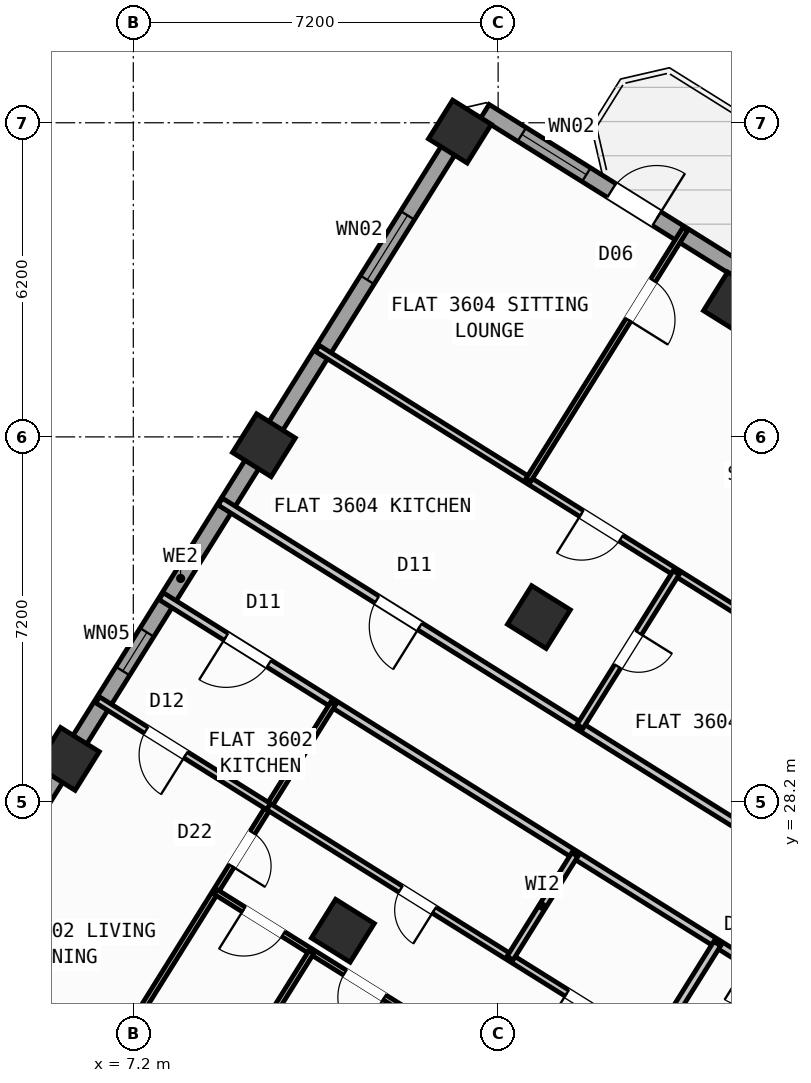
"""IFC4 building model, lengths in metres.
Left out: names, types, materials, properties, quantities, classifications, styles, units other than length and angle.
Written with IfcOpenShell. Run it as: python <this file> out.ifc"""

import sys

from ifc_helpers import new_model, si_unit, direction, frame, frame_2d, origin, origin_2d, place, context, subcontext, project, spatial, rectangle, hollow_rectangle, extrude, source, transform, mapped, element, fill, save


model = new_model("IFC4")
c1 = context("Model", 3, precision=1e-05, world=origin(), true_north=direction((0.0, 1.0)))
c2 = subcontext(c1, "Body", "Model", "MODEL_VIEW")
j1 = project(units=[si_unit("LENGTHUNIT", "METRE"), si_unit("PLANEANGLEUNIT", "RADIAN")], contexts=[c1])
p1 = place(None, origin())
s1 = spatial("IfcSite", under=j1, at=p1, CompositionType="ELEMENT")
p2 = place(p1, origin())
s2 = spatial("IfcBuilding", under=s1, at=p2, CompositionType="ELEMENT")
p3 = place(p2, frame((0.0, 0.0, 144.3)))
s3 = spatial("IfcBuildingStorey", under=s2, at=p3, CompositionType="ELEMENT", Elevation=144.3)
m1 = source(origin(), c2, "Body", "SweptSolid", [
    extrude(hollow_rectangle(XDim=0.9, YDim=0.9, WallThickness=0.036, at=origin_2d()), origin(), (0.0, 0.0, 1.0), 3.6),
])
for number, where, z_axis, x_axis in (
    (1, (19.073, 38.034, 0.0), (0.0, 0.0, 1.0), (-0.848, 0.53, 0.0)),
    (2, (15.205, 31.844, 0.0), (0.0, 0.0, 1.0), (-0.848, 0.53, 0.0)),
    (3, (11.336, 25.653, 0.0), (0.0, 0.0, 1.0), (-0.848, 0.53, 0.0)),
    (4, (13.646, 41.426, 0.0), (0.0, 0.0, 1.0), (-0.848, 0.53, 0.0)),
    (5, (9.777, 35.235, 0.0), (0.0, 0.0, 1.0), (-0.848, 0.53, 0.0)),
    (6, (5.909, 29.044, 0.0), (0.0, 0.0, 1.0), (-0.848, 0.53, 0.0)),
):
    element("IfcColumn", number, at=place(p3, frame(where, z_axis=z_axis, x_axis=x_axis)), inside=s3, PredefinedType="COLUMN", context=c2, shape_type="MappedRepresentation", body=[
        mapped(m1, transform((0.0, 0.0, 0.0), scale=1.0)),
    ])
p4 = place(p3, frame((2.415, 23.452, 0.0), z_axis=(0.0, 0.0, 1.0), x_axis=(0.52991049553, 0.848053575387, 0.0)))
e7 = element("IfcWall", 7, at=p4, inside=s3, PredefinedType="STANDARD", context=c2, shape_type="SweptSolid", body=[
    extrude(rectangle(XDim=21.587, YDim=0.32, at=frame_2d((10.794, 0.0))), origin(), (0.0, 0.0, 1.0), 2.775),
])
p5 = place(p4, frame((2.356, 0.0, 0.8)))
e8 = element("IfcOpeningElement", 8, at=p5, cuts=e7, PredefinedType="OPENING", context=c2, shape_type="SweptSolid", body=[
    extrude(rectangle(XDim=2.1, YDim=1.55, at=frame_2d((1.05, 0.775))), frame((0.0, 0.17, 0.0), z_axis=(0.0, -1.0, 0.0), x_axis=(1.0, 0.0, 0.0)), (0.0, 0.0, 1.0), 0.34),
])
p6 = place(p4, frame((8.639, 0.0, 1.0)))
e9 = element("IfcOpeningElement", 9, at=p6, cuts=e7, PredefinedType="OPENING", context=c2, shape_type="SweptSolid", body=[
    extrude(rectangle(XDim=0.9, YDim=1.25, at=frame_2d((0.45, 0.625))), frame((0.0, 0.17, 0.0), z_axis=(0.0, -1.0, 0.0), x_axis=(1.0, 0.0, 0.0)), (0.0, 0.0, 1.0), 0.34),
])
p7 = place(p4, frame((17.744, 0.0, 0.85)))
e10 = element("IfcOpeningElement", 10, at=p7, cuts=e7, PredefinedType="OPENING", context=c2, shape_type="SweptSolid", body=[
    extrude(rectangle(XDim=1.5, YDim=1.5, at=frame_2d((0.75, 0.75))), frame((0.0, 0.17, 0.0), z_axis=(0.0, -1.0, 0.0), x_axis=(1.0, 0.0, 0.0)), (0.0, 0.0, 1.0), 0.34),
])
p8 = place(p3, frame((14.138, 41.825, 0.0), z_axis=(0.0, 0.0, 1.0), x_axis=(0.848046498049, -0.529921821731, 0.0)))
e11 = element("IfcWall", 11, at=p8, inside=s3, PredefinedType="STANDARD", context=c2, shape_type="SweptSolid", body=[
    extrude(rectangle(XDim=31.588, YDim=0.32, at=frame_2d((15.794, 0.0))), origin(), (0.0, 0.0, 1.0), 3.35),
])
p9 = place(p8, frame((2.949, 0.0, 0.0)))
e12 = element("IfcOpeningElement", 12, at=p9, cuts=e11, PredefinedType="OPENING", context=c2, shape_type="SweptSolid", body=[
    extrude(rectangle(XDim=1.05, YDim=2.15, at=frame_2d((0.525, 1.075))), frame((0.0, 0.17, 0.0), z_axis=(0.0, -1.0, 0.0), x_axis=(1.0, 0.0, 0.0)), (0.0, 0.0, 1.0), 0.34),
])
p10 = place(p8, frame((0.861, 0.0, 0.85)))
e13 = element("IfcOpeningElement", 13, at=p10, cuts=e11, PredefinedType="OPENING", context=c2, shape_type="SweptSolid", body=[
    extrude(rectangle(XDim=1.5, YDim=1.5, at=frame_2d((0.75, 0.75))), frame((0.0, 0.17, 0.0), z_axis=(0.0, -1.0, 0.0), x_axis=(1.0, 0.0, 0.0)), (0.0, 0.0, 1.0), 0.34),
])
p11 = place(p8, frame((8.494, 0.0, 0.85)))
e14 = element("IfcOpeningElement", 14, at=p11, cuts=e11, PredefinedType="OPENING", context=c2, shape_type="SweptSolid", body=[
    extrude(rectangle(XDim=1.8, YDim=1.5, at=frame_2d((0.9, 0.75))), frame((0.0, 0.17, 0.0), z_axis=(0.0, -1.0, 0.0), x_axis=(1.0, 0.0, 0.0)), (0.0, 0.0, 1.0), 0.34),
])
p12 = place(p8, frame((13.874, 0.0, 0.85)))
e15 = element("IfcOpeningElement", 15, at=p12, cuts=e11, PredefinedType="OPENING", context=c2, shape_type="SweptSolid", body=[
    extrude(rectangle(XDim=1.5, YDim=1.5, at=frame_2d((0.75, 0.75))), frame((0.0, 0.17, 0.0), z_axis=(0.0, -1.0, 0.0), x_axis=(1.0, 0.0, 0.0)), (0.0, 0.0, 1.0), 0.34),
])
p13 = place(p8, frame((17.104, 0.0, 1.0)))
e16 = element("IfcOpeningElement", 16, at=p13, cuts=e11, PredefinedType="OPENING", context=c2, shape_type="SweptSolid", body=[
    extrude(rectangle(XDim=0.9, YDim=1.25, at=frame_2d((0.45, 0.625))), frame((0.0, 0.17, 0.0), z_axis=(0.0, -1.0, 0.0), x_axis=(1.0, 0.0, 0.0)), (0.0, 0.0, 1.0), 0.34),
])
p14 = place(p8, frame((22.144, 0.0, 1.0)))
e17 = element("IfcOpeningElement", 17, at=p14, cuts=e11, PredefinedType="OPENING", context=c2, shape_type="SweptSolid", body=[
    extrude(rectangle(XDim=0.9, YDim=1.25, at=frame_2d((0.45, 0.625))), frame((0.0, 0.17, 0.0), z_axis=(0.0, -1.0, 0.0), x_axis=(1.0, 0.0, 0.0)), (0.0, 0.0, 1.0), 0.34),
])
p15 = place(p8, frame((27.744, 0.0, 1.0)))
e18 = element("IfcOpeningElement", 18, at=p15, cuts=e11, PredefinedType="OPENING", context=c2, shape_type="SweptSolid", body=[
    extrude(rectangle(XDim=0.9, YDim=1.25, at=frame_2d((0.45, 0.625))), frame((0.0, 0.17, 0.0), z_axis=(0.0, -1.0, 0.0), x_axis=(1.0, 0.0, 0.0)), (0.0, 0.0, 1.0), 0.34),
])
p16 = place(p3, frame((23.104, 25.256, 0.0), z_axis=(0.0, 0.0, 1.0), x_axis=(-0.848041752158, 0.529929416617, 0.0)))
e19 = element("IfcWall", 19, at=p16, inside=s3, PredefinedType="PARTITIONING", context=c2, shape_type="SweptSolid", body=[
    extrude(rectangle(XDim=16.73, YDim=0.16, at=frame_2d((8.365, 0.0))), origin(), (0.0, 0.0, 1.0), 3.34),
])
p17 = place(p16, frame((2.22, 0.0, 0.0)))
e20 = element("IfcOpeningElement", 20, at=p17, cuts=e19, PredefinedType="OPENING", context=c2, shape_type="SweptSolid", body=[
    extrude(rectangle(XDim=0.86, YDim=2.05, at=frame_2d((0.43, 1.025))), frame((0.0, 0.09, 0.0), z_axis=(0.0, -1.0, 0.0), x_axis=(1.0, 0.0, 0.0)), (0.0, 0.0, 1.0), 0.18),
])
p18 = place(p16, frame((12.084, 0.0, 0.0)))
e21 = element("IfcOpeningElement", 21, at=p18, cuts=e19, PredefinedType="OPENING", context=c2, shape_type="SweptSolid", body=[
    extrude(rectangle(XDim=1.0, YDim=2.1, at=frame_2d((0.5, 1.05))), frame((0.0, 0.09, 0.0), z_axis=(0.0, -1.0, 0.0), x_axis=(1.0, 0.0, 0.0)), (0.0, 0.0, 1.0), 0.18),
])
p19 = place(p3, frame((21.938, 23.391, 0.0), z_axis=(0.0, 0.0, 1.0), x_axis=(-0.848045850158, 0.529922858565, 0.0)))
e22 = element("IfcWall", 22, at=p19, inside=s3, PredefinedType="PARTITIONING", context=c2, shape_type="SweptSolid", body=[
    extrude(rectangle(XDim=16.73, YDim=0.16, at=frame_2d((8.365, 0.0))), origin(), (0.0, 0.0, 1.0), 3.34),
])
p20 = place(p19, frame((2.22, 0.0, 0.0)))
e23 = element("IfcOpeningElement", 23, at=p20, cuts=e22, PredefinedType="OPENING", context=c2, shape_type="SweptSolid", body=[
    extrude(rectangle(XDim=0.86, YDim=2.05, at=frame_2d((0.43, 1.025))), frame((0.0, 0.09, 0.0), z_axis=(0.0, -1.0, 0.0), x_axis=(1.0, 0.0, 0.0)), (0.0, 0.0, 1.0), 0.18),
])
p21 = place(p19, frame((14.22, 0.0, 0.0)))
e24 = element("IfcOpeningElement", 24, at=p21, cuts=e22, PredefinedType="OPENING", context=c2, shape_type="SweptSolid", body=[
    extrude(rectangle(XDim=1.0, YDim=2.1, at=frame_2d((0.5, 1.05))), frame((0.0, 0.09, 0.0), z_axis=(0.0, -1.0, 0.0), x_axis=(1.0, 0.0, 0.0)), (0.0, 0.0, 1.0), 0.18),
])
p22 = place(p3, frame((18.724, 25.399, 0.0), z_axis=(0.0, 0.0, 1.0), x_axis=(-0.529890499457, -0.848066069705, 0.0)))
e25 = element("IfcWall", 25, at=p22, inside=s3, PredefinedType="PARTITIONING", context=c2, shape_type="SweptSolid", body=[
    extrude(rectangle(XDim=3.238, YDim=0.16, at=frame_2d((1.619, 0.0))), origin(), (0.0, 0.0, 1.0), 2.775),
])
p23 = place(p3, frame((20.624, 24.212, 0.0), z_axis=(0.0, 0.0, 1.0), x_axis=(-0.529919283494, -0.848048084121, 0.0)))
e26 = element("IfcWall", 26, at=p23, inside=s3, PredefinedType="PLUMBINGWALL", context=c2, shape_type="SweptSolid", body=[
    extrude(rectangle(XDim=5.51, YDim=0.14, at=frame_2d((2.755, 0.0))), origin(), (0.0, 0.0, 1.0), 2.995),
])
p24 = place(p23, frame((2.365, 0.0, 0.0)))
e27 = element("IfcOpeningElement", 27, at=p24, cuts=e26, PredefinedType="OPENING", context=c2, shape_type="SweptSolid", body=[
    extrude(rectangle(XDim=0.78, YDim=2.05, at=frame_2d((0.39, 1.025))), frame((0.0, 0.08, 0.0), z_axis=(0.0, -1.0, 0.0), x_axis=(1.0, 0.0, 0.0)), (0.0, 0.0, 1.0), 0.16),
])
p25 = place(p3, frame((11.143, 30.136, 0.0), z_axis=(0.0, 0.0, 1.0), x_axis=(-0.529922479612, -0.848046086956, 0.0)))
e28 = element("IfcWall", 28, at=p25, inside=s3, PredefinedType="PARTITIONING", context=c2, shape_type="SweptSolid", body=[
    extrude(rectangle(XDim=10.62, YDim=0.11, at=frame_2d((5.31, 0.0))), origin(), (0.0, 0.0, 1.0), 3.34),
])
p26 = place(p25, frame((3.0, 0.0, 0.0)))
e29 = element("IfcOpeningElement", 29, at=p26, cuts=e28, PredefinedType="OPENING", context=c2, shape_type="SweptSolid", body=[
    extrude(rectangle(XDim=0.78, YDim=2.05, at=frame_2d((0.39, 1.025))), frame((0.0, 0.065, 0.0), z_axis=(0.0, -1.0, 0.0), x_axis=(1.0, 0.0, 0.0)), (0.0, 0.0, 1.0), 0.13),
])
p27 = place(p3, frame((9.871, 28.101, 0.0), z_axis=(0.0, 0.0, 1.0), x_axis=(-0.848025873403, 0.529954826413, 0.0)))
e30 = element("IfcWall", 30, at=p27, inside=s3, PredefinedType="PLUMBINGWALL", context=c2, shape_type="SweptSolid", body=[
    extrude(rectangle(XDim=3.98, YDim=0.14, at=frame_2d((1.99, 0.0))), origin(), (0.0, 0.0, 1.0), 3.34),
])
p28 = place(p27, frame((1.93, 0.0, 0.0)))
e31 = element("IfcOpeningElement", 31, at=p28, cuts=e30, PredefinedType="OPENING", context=c2, shape_type="SweptSolid", body=[
    extrude(rectangle(XDim=0.92, YDim=2.08, at=frame_2d((0.46, 1.04))), frame((0.0, 0.08, 0.0), z_axis=(0.0, -1.0, 0.0), x_axis=(1.0, 0.0, 0.0)), (0.0, 0.0, 1.0), 0.16),
])
p29 = place(p3, frame((17.452, 23.364, 0.0), z_axis=(0.0, 0.0, 1.0), x_axis=(-0.848044326704, 0.52992529657, 0.0)))
e32 = element("IfcWall", 32, at=p29, inside=s3, PredefinedType="PLUMBINGWALL", context=c2, shape_type="SweptSolid", body=[
    extrude(rectangle(XDim=8.94, YDim=0.14, at=frame_2d((4.47, 0.0))), origin(), (0.0, 0.0, 1.0), 3.34),
])
p30 = place(p29, frame((5.087, 0.0, 0.0)))
e33 = element("IfcOpeningElement", 33, at=p30, cuts=e32, PredefinedType="OPENING", context=c2, shape_type="SweptSolid", body=[
    extrude(rectangle(XDim=0.78, YDim=2.05, at=frame_2d((0.39, 1.025))), frame((0.0, 0.08, 0.0), z_axis=(0.0, -1.0, 0.0), x_axis=(1.0, 0.0, 0.0)), (0.0, 0.0, 1.0), 0.16),
])
p31 = place(p29, frame((1.218, 0.0, 0.0)))
e34 = element("IfcOpeningElement", 34, at=p31, cuts=e32, PredefinedType="OPENING", context=c2, shape_type="SweptSolid", body=[
    extrude(rectangle(XDim=0.78, YDim=2.05, at=frame_2d((0.39, 1.025))), frame((0.0, 0.08, 0.0), z_axis=(0.0, -1.0, 0.0), x_axis=(1.0, 0.0, 0.0)), (0.0, 0.0, 1.0), 0.16),
])
p32 = place(p3, frame((15.913, 27.156, 0.0), z_axis=(0.0, 0.0, 1.0), x_axis=(-0.529935194983, -0.848038141311, 0.0)))
e35 = element("IfcWall", 35, at=p32, inside=s3, PredefinedType="PLUMBINGWALL", context=c2, shape_type="SweptSolid", body=[
    extrude(rectangle(XDim=2.41, YDim=0.14, at=frame_2d((1.205, 0.0))), origin(), (0.0, 0.0, 1.0), 3.34),
])
p33 = place(p3, frame((16.403, 21.685, 0.0), z_axis=(0.0, 0.0, 1.0), x_axis=(-0.848044326704, 0.52992529657, 0.0)))
e36 = element("IfcWall", 36, at=p33, inside=s3, PredefinedType="PARTITIONING", context=c2, shape_type="SweptSolid", body=[
    extrude(rectangle(XDim=8.94, YDim=0.11, at=frame_2d((4.47, 0.0))), origin(), (0.0, 0.0, 1.0), 3.34),
])
p34 = place(p33, frame((0.657, 0.0, 0.0)))
e37 = element("IfcOpeningElement", 37, at=p34, cuts=e36, PredefinedType="OPENING", context=c2, shape_type="SweptSolid", body=[
    extrude(rectangle(XDim=0.92, YDim=2.08, at=frame_2d((0.46, 1.04))), frame((0.0, 0.065, 0.0), z_axis=(0.0, -1.0, 0.0), x_axis=(1.0, 0.0, 0.0)), (0.0, 0.0, 1.0), 0.13),
])
p35 = place(p33, frame((2.893, 0.0, 0.0)))
e38 = element("IfcOpeningElement", 38, at=p35, cuts=e36, PredefinedType="OPENING", context=c2, shape_type="SweptSolid", body=[
    extrude(rectangle(XDim=0.92, YDim=2.08, at=frame_2d((0.46, 1.04))), frame((0.0, 0.065, 0.0), z_axis=(0.0, -1.0, 0.0), x_axis=(1.0, 0.0, 0.0)), (0.0, 0.0, 1.0), 0.13),
])
p36 = place(p33, frame((5.008, 0.0, 0.0)))
e39 = element("IfcOpeningElement", 39, at=p36, cuts=e36, PredefinedType="OPENING", context=c2, shape_type="SweptSolid", body=[
    extrude(rectangle(XDim=0.92, YDim=2.08, at=frame_2d((0.46, 1.04))), frame((0.0, 0.065, 0.0), z_axis=(0.0, -1.0, 0.0), x_axis=(1.0, 0.0, 0.0)), (0.0, 0.0, 1.0), 0.13),
])
p37 = place(p33, frame((7.363, 0.0, 0.0)))
e40 = element("IfcOpeningElement", 40, at=p37, cuts=e36, PredefinedType="OPENING", context=c2, shape_type="SweptSolid", body=[
    extrude(rectangle(XDim=0.92, YDim=2.08, at=frame_2d((0.46, 1.04))), frame((0.0, 0.065, 0.0), z_axis=(0.0, -1.0, 0.0), x_axis=(1.0, 0.0, 0.0)), (0.0, 0.0, 1.0), 0.13),
])
p38 = place(p3, frame((10.717, 25.238, 0.0), z_axis=(0.0, 0.0, 1.0), x_axis=(-0.52991804857, -0.848048855786, 0.0)))
e41 = element("IfcWall", 41, at=p38, inside=s3, PredefinedType="PARTITIONING", context=c2, shape_type="SweptSolid", body=[
    extrude(rectangle(XDim=6.24, YDim=0.11, at=frame_2d((3.12, 0.0))), origin(), (0.0, 0.0, 1.0), 3.34),
])
p39 = place(p3, frame((21.787, 30.301, 0.0), z_axis=(0.0, 0.0, 1.0), x_axis=(-0.848043949058, 0.52992590092, 0.0)))
e42 = element("IfcWall", 42, at=p39, inside=s3, PredefinedType="PLUMBINGWALL", context=c2, shape_type="SweptSolid", body=[
    extrude(rectangle(XDim=12.92, YDim=0.14, at=frame_2d((6.46, 0.0))), origin(), (0.0, 0.0, 1.0), 3.34),
])
p40 = place(p39, frame((5.849, 0.0, 0.0)))
e43 = element("IfcOpeningElement", 43, at=p40, cuts=e42, PredefinedType="OPENING", context=c2, shape_type="SweptSolid", body=[
    extrude(rectangle(XDim=0.92, YDim=2.08, at=frame_2d((0.46, 1.04))), frame((0.0, 0.08, 0.0), z_axis=(0.0, -1.0, 0.0), x_axis=(1.0, 0.0, 0.0)), (0.0, 0.0, 1.0), 0.16),
])
p41 = place(p3, frame((17.913, 32.721, 0.0), z_axis=(0.0, 0.0, 1.0), x_axis=(-0.529906983049, -0.848055770169, 0.0)))
e44 = element("IfcWall", 44, at=p41, inside=s3, PredefinedType="PLUMBINGWALL", context=c2, shape_type="SweptSolid", body=[
    extrude(rectangle(XDim=3.58, YDim=0.14, at=frame_2d((1.79, 0.0))), origin(), (0.0, 0.0, 1.0), 3.34),
])
p42 = place(p41, frame((1.4, 0.0, 0.0)))
e45 = element("IfcOpeningElement", 45, at=p42, cuts=e44, PredefinedType="OPENING", context=c2, shape_type="SweptSolid", body=[
    extrude(rectangle(XDim=0.78, YDim=2.05, at=frame_2d((0.39, 1.025))), frame((0.0, 0.08, 0.0), z_axis=(0.0, -1.0, 0.0), x_axis=(1.0, 0.0, 0.0)), (0.0, 0.0, 1.0), 0.16),
])
p43 = place(p3, frame((18.089, 39.498, 0.0), z_axis=(0.0, 0.0, 1.0), x_axis=(-0.529916267533, -0.848049968695, 0.0)))
e46 = element("IfcWall", 46, at=p43, inside=s3, PredefinedType="PARTITIONING", context=c2, shape_type="SweptSolid", body=[
    extrude(rectangle(XDim=5.84, YDim=0.11, at=frame_2d((2.92, 0.0))), origin(), (0.0, 0.0, 1.0), 3.34),
])
p44 = place(p43, frame((1.19, 0.0, 0.0)))
e47 = element("IfcOpeningElement", 47, at=p44, cuts=e46, PredefinedType="OPENING", context=c2, shape_type="SweptSolid", body=[
    extrude(rectangle(XDim=0.92, YDim=2.08, at=frame_2d((0.46, 1.04))), frame((0.0, 0.065, 0.0), z_axis=(0.0, -1.0, 0.0), x_axis=(1.0, 0.0, 0.0)), (0.0, 0.0, 1.0), 0.13),
])
m2 = source(origin(), c2, "Body", "SweptSolid", [
    extrude(rectangle(XDim=1.05, YDim=2.15, at=frame_2d((0.525, 1.075))), frame((0.0, 0.025, 0.0), z_axis=(0.0, -1.0, 0.0), x_axis=(1.0, 0.0, 0.0)), (0.0, 0.0, 1.0), 0.05),
])
p45 = place(p9, origin())
e48 = element("IfcDoor", 48, at=p45, inside=s3, OperationType="SINGLE_SWING_RIGHT", PredefinedType="DOOR", context=c2, shape_type="MappedRepresentation", body=[
    mapped(m2, transform((0.0, 0.0, 0.0), scale=1.0)),
])
fill(e12, e48)
m3 = source(origin(), c2, "Body", "SweptSolid", [
    extrude(rectangle(XDim=0.9, YDim=1.25, at=frame_2d((0.45, 0.625))), frame((0.0, 0.03, 0.0), z_axis=(0.0, -1.0, 0.0), x_axis=(1.0, 0.0, 0.0)), (0.0, 0.0, 1.0), 0.06),
])
p46 = place(p6, origin())
e49 = element("IfcWindow", 49, at=p46, inside=s3, PartitioningType="SINGLE_PANEL", PredefinedType="WINDOW", context=c2, shape_type="MappedRepresentation", body=[
    mapped(m3, transform((0.0, 0.0, 0.0), scale=1.0)),
])
fill(e9, e49)
m4 = source(origin(), c2, "Body", "SweptSolid", [
    extrude(rectangle(XDim=1.5, YDim=1.5, at=frame_2d((0.75, 0.75))), frame((0.0, 0.03, 0.0), z_axis=(0.0, -1.0, 0.0), x_axis=(1.0, 0.0, 0.0)), (0.0, 0.0, 1.0), 0.06),
])
p47 = place(p7, origin())
e50 = element("IfcWindow", 50, at=p47, inside=s3, PartitioningType="SINGLE_PANEL", PredefinedType="WINDOW", context=c2, shape_type="MappedRepresentation", body=[
    mapped(m4, transform((0.0, 0.0, 0.0), scale=1.0)),
])
fill(e10, e50)
p48 = place(p10, origin())
e51 = element("IfcWindow", 51, at=p48, inside=s3, PartitioningType="SINGLE_PANEL", PredefinedType="WINDOW", context=c2, shape_type="MappedRepresentation", body=[
    mapped(m4, transform((0.0, 0.0, 0.0), scale=1.0)),
])
fill(e13, e51)
m5 = source(origin(), c2, "Body", "SweptSolid", [
    extrude(rectangle(XDim=1.0, YDim=2.1, at=frame_2d((0.5, 1.05))), frame((0.0, 0.025, 0.0), z_axis=(0.0, -1.0, 0.0), x_axis=(1.0, 0.0, 0.0)), (0.0, 0.0, 1.0), 0.05),
])
p49 = place(p21, origin())
e52 = element("IfcDoor", 52, at=p49, inside=s3, OperationType="SINGLE_SWING_RIGHT", PredefinedType="DOOR", context=c2, shape_type="MappedRepresentation", body=[
    mapped(m5, transform((0.0, 0.0, 0.0), scale=1.0)),
])
fill(e24, e52)
m6 = source(origin(), c2, "Body", "SweptSolid", [
    extrude(rectangle(XDim=0.92, YDim=2.08, at=frame_2d((0.46, 1.04))), frame((0.0, 0.025, 0.0), z_axis=(0.0, -1.0, 0.0), x_axis=(1.0, 0.0, 0.0)), (0.0, 0.0, 1.0), 0.05),
])
p50 = place(p28, origin())
e53 = element("IfcDoor", 53, at=p50, inside=s3, OperationType="SINGLE_SWING_LEFT", PredefinedType="DOOR", context=c2, shape_type="MappedRepresentation", body=[
    mapped(m6, transform((0.0, 0.0, 0.0), scale=1.0)),
])
fill(e31, e53)
m7 = source(origin(), c2, "Body", "SweptSolid", [
    extrude(rectangle(XDim=0.78, YDim=2.05, at=frame_2d((0.39, 1.025))), frame((0.0, 0.025, 0.0), z_axis=(0.0, -1.0, 0.0), x_axis=(1.0, 0.0, 0.0)), (0.0, 0.0, 1.0), 0.05),
])
p51 = place(p26, origin())
e54 = element("IfcDoor", 54, at=p51, inside=s3, OperationType="SINGLE_SWING_RIGHT", PredefinedType="DOOR", context=c2, shape_type="MappedRepresentation", body=[
    mapped(m7, transform((0.0, 0.0, 0.0), scale=1.0)),
])
fill(e29, e54)
p52 = place(p30, origin())
e55 = element("IfcDoor", 55, at=p52, inside=s3, OperationType="SINGLE_SWING_LEFT", PredefinedType="DOOR", context=c2, shape_type="MappedRepresentation", body=[
    mapped(m7, transform((0.0, 0.0, 0.0), scale=1.0)),
])
fill(e33, e55)
p53 = place(p31, origin())
e56 = element("IfcDoor", 56, at=p53, inside=s3, OperationType="SINGLE_SWING_RIGHT", PredefinedType="DOOR", context=c2, shape_type="MappedRepresentation", body=[
    mapped(m7, transform((0.0, 0.0, 0.0), scale=1.0)),
])
fill(e34, e56)
p54 = place(p36, origin())
e57 = element("IfcDoor", 57, at=p54, inside=s3, OperationType="SINGLE_SWING_LEFT", PredefinedType="DOOR", context=c2, shape_type="MappedRepresentation", body=[
    mapped(m6, transform((0.0, 0.0, 0.0), scale=1.0)),
])
fill(e39, e57)
p55 = place(p37, origin())
e58 = element("IfcDoor", 58, at=p55, inside=s3, OperationType="SINGLE_SWING_RIGHT", PredefinedType="DOOR", context=c2, shape_type="MappedRepresentation", body=[
    mapped(m6, transform((0.0, 0.0, 0.0), scale=1.0)),
])
fill(e40, e58)
p56 = place(p44, origin())
e59 = element("IfcDoor", 59, at=p56, inside=s3, OperationType="SINGLE_SWING_RIGHT", PredefinedType="DOOR", context=c2, shape_type="MappedRepresentation", body=[
    mapped(m6, transform((0.0, 0.0, 0.0), scale=1.0)),
])
fill(e47, e59)
p57 = place(p18, origin())
e60 = element("IfcDoor", 60, at=p57, inside=s3, OperationType="SINGLE_SWING_LEFT", PredefinedType="DOOR", context=c2, shape_type="MappedRepresentation", body=[
    mapped(m5, transform((0.0, 0.0, 0.0), scale=1.0)),
])
fill(e21, e60)
p58 = place(p40, origin())
e61 = element("IfcDoor", 61, at=p58, inside=s3, OperationType="SINGLE_SWING_RIGHT", PredefinedType="DOOR", context=c2, shape_type="MappedRepresentation", body=[
    mapped(m6, transform((0.0, 0.0, 0.0), scale=1.0)),
])
fill(e43, e61)
p59 = place(p42, origin())
e62 = element("IfcDoor", 62, at=p59, inside=s3, OperationType="SINGLE_SWING_LEFT", PredefinedType="DOOR", context=c2, shape_type="MappedRepresentation", body=[
    mapped(m7, transform((0.0, 0.0, 0.0), scale=1.0)),
])
fill(e45, e62)
save(model, sys.argv[1])
